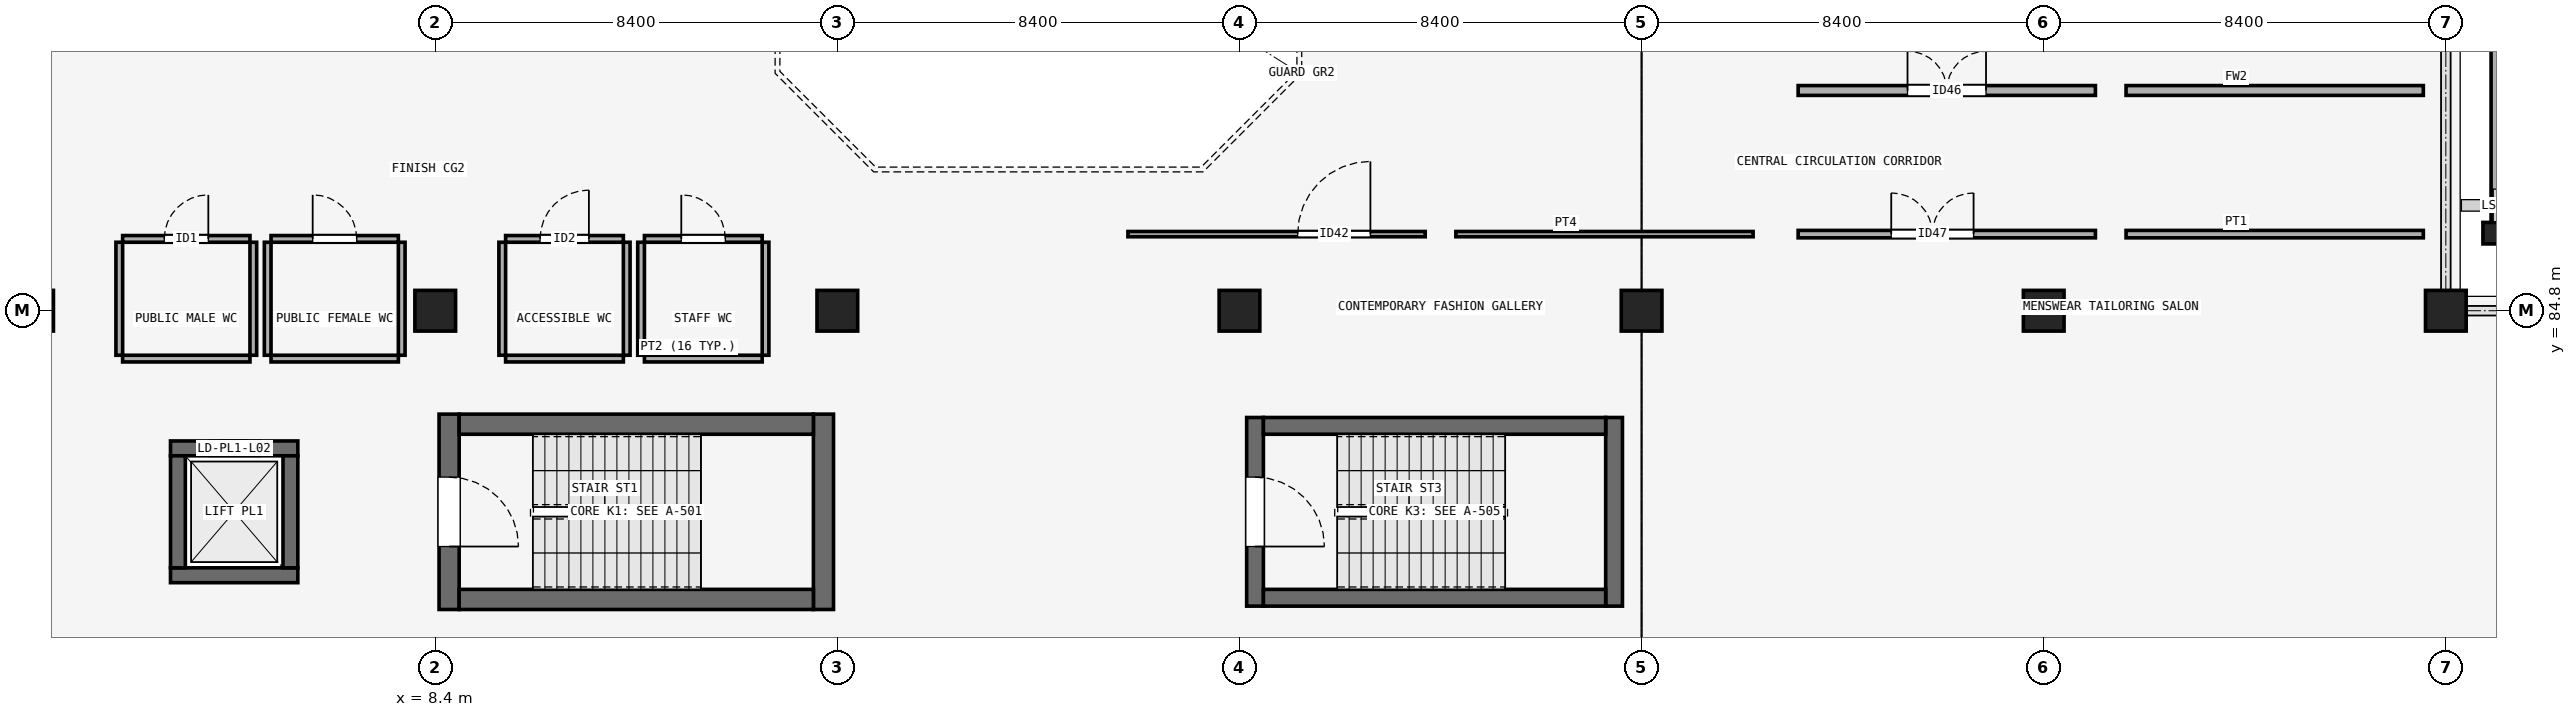
"""IFC4 building model, lengths in metres.
Left out: names, types, materials, properties, quantities, classifications, styles, units other than length and angle.
Written with IfcOpenShell. Run it as: python <this file> out.ifc"""

import sys

from ifc_helpers import new_model, si_unit, direction, frame, frame_2d, origin, origin_2d, place, context, subcontext, project, spatial, rectangle, extrude, element, fill, save


model = new_model("IFC4")
c1 = context("Model", 3, precision=1e-05, world=origin(), true_north=direction((0.0, 1.0)))
c2 = subcontext(c1, "Body", "Model", "MODEL_VIEW")
j1 = project(units=[si_unit("LENGTHUNIT", "METRE"), si_unit("PLANEANGLEUNIT", "RADIAN")], contexts=[c1])
p1 = place(None, origin())
s1 = spatial("IfcSite", under=j1, at=p1, CompositionType="ELEMENT")
p2 = place(p1, origin())
s2 = spatial("IfcBuilding", under=s1, at=p2, CompositionType="ELEMENT")
p3 = place(p2, frame((0.0, 0.0, 9.9)))
s3 = spatial("IfcBuildingStorey", under=s2, at=p3, CompositionType="ELEMENT", Elevation=9.9)
for number, where, z_axis, x_axis in (
    (1, (0.0, 84.8, 0.0), (0.0, 0.0, 1.0), (1.0, 0.0, 0.0)),
    (2, (8.4, 84.8, 0.0), (0.0, 0.0, 1.0), (1.0, 0.0, 0.0)),
    (3, (16.8, 84.8, 0.0), (0.0, 0.0, 1.0), (1.0, 0.0, 0.0)),
    (4, (25.2, 84.8, 0.0), (0.0, 0.0, 1.0), (1.0, 0.0, 0.0)),
    (5, (33.6, 84.8, 0.0), (0.0, 0.0, 1.0), (1.0, 0.0, 0.0)),
    (6, (42.0, 84.8, 0.0), (0.0, 0.0, 1.0), (1.0, 0.0, 0.0)),
    (7, (50.4, 84.8, 0.0), (0.0, 0.0, 1.0), (1.0, 0.0, 0.0)),
):
    element("IfcColumn", number, at=place(p3, frame(where, z_axis=z_axis, x_axis=x_axis)), inside=s3, PredefinedType="COLUMN", context=c2, shape_type="SweptSolid", body=[
        extrude(rectangle(XDim=0.85, YDim=0.85, at=origin_2d()), origin(), (0.0, 0.0, 1.0), 4.5),
    ])
p4 = place(p3, frame((51.45, 86.42, 0.0), z_axis=(0.0, 0.0, 1.0), x_axis=(0.0, 1.0, 0.0)))
e8 = element("IfcColumn", 8, at=p4, inside=s3, PredefinedType="PILASTER", context=c2, shape_type="SweptSolid", body=[
    extrude(rectangle(XDim=0.45, YDim=0.55, at=origin_2d()), origin(), (0.0, 0.0, 1.0), 4.5),
])
p5 = place(p3, frame((51.45, 86.67, 3.88), z_axis=(0.0, 0.0, 1.0), x_axis=(0.0, 1.0, 0.0)))
e9 = element("IfcWall", 9, at=p5, inside=s3, PredefinedType="PARAPET", context=c2, shape_type="SweptSolid", body=[
    extrude(rectangle(XDim=4.66, YDim=0.21, at=frame_2d((2.33, 0.0))), origin(), (0.0, 0.0, 1.0), 0.12),
])
p6 = place(p3, frame((8.69, 82.64, 0.0), z_axis=(0.0, 0.0, 1.0), x_axis=(0.0, -1.0, 0.0)))
e10 = element("IfcWall", 10, at=p6, inside=s3, PredefinedType="SHEAR", context=c2, shape_type="SweptSolid", body=[
    extrude(rectangle(XDim=4.08, YDim=0.42, at=frame_2d((2.04, 0.0))), origin(), (0.0, 0.0, 1.0), 4.2),
])
p7 = place(p6, frame((1.315, 0.0, 0.0)))
e11 = element("IfcOpeningElement", 11, at=p7, cuts=e10, PredefinedType="OPENING", context=c2, shape_type="SweptSolid", body=[
    extrude(rectangle(XDim=1.45, YDim=2.2, at=frame_2d((0.725, 1.1))), frame((0.0, 0.22, 0.0), z_axis=(0.0, -1.0, 0.0), x_axis=(1.0, 0.0, 0.0)), (0.0, 0.0, 1.0), 0.44),
])
p8 = place(p3, frame((16.51, 78.56, 0.0), z_axis=(0.0, 0.0, 1.0), x_axis=(0.0, 1.0, 0.0)))
e12 = element("IfcWall", 12, at=p8, inside=s3, PredefinedType="SHEAR", context=c2, shape_type="SweptSolid", body=[
    extrude(rectangle(XDim=4.08, YDim=0.42, at=frame_2d((2.04, 0.0))), origin(), (0.0, 0.0, 1.0), 4.2),
])
for number, where, z_axis, x_axis in (
    (13, (8.9, 78.77, 0.0), (0.0, 0.0, 1.0), (1.0, 0.0, 0.0)),
    (14, (8.9, 82.43, 0.0), (0.0, 0.0, 1.0), (1.0, 0.0, 0.0)),
):
    element("IfcWall", number, at=place(p3, frame(where, z_axis=z_axis, x_axis=x_axis)), inside=s3, PredefinedType="SHEAR", context=c2, shape_type="SweptSolid", body=[
        extrude(rectangle(XDim=7.4, YDim=0.42, at=frame_2d((3.7, 0.0))), origin(), (0.0, 0.0, 1.0), 4.2),
    ])
p9 = place(p3, frame((25.525, 82.57, 0.0), z_axis=(0.0, 0.0, 1.0), x_axis=(0.0, -1.0, 0.0)))
e15 = element("IfcWall", 15, at=p9, inside=s3, PredefinedType="SHEAR", context=c2, shape_type="SweptSolid", body=[
    extrude(rectangle(XDim=3.94, YDim=0.35, at=frame_2d((1.97, 0.0))), origin(), (0.0, 0.0, 1.0), 4.2),
])
p10 = place(p9, frame((1.245, 0.0, 0.0)))
e16 = element("IfcOpeningElement", 16, at=p10, cuts=e15, PredefinedType="OPENING", context=c2, shape_type="SweptSolid", body=[
    extrude(rectangle(XDim=1.45, YDim=2.2, at=frame_2d((0.725, 1.1))), frame((0.0, 0.185, 0.0), z_axis=(0.0, -1.0, 0.0), x_axis=(1.0, 0.0, 0.0)), (0.0, 0.0, 1.0), 0.37),
])
p11 = place(p3, frame((33.025, 78.63, 0.0), z_axis=(0.0, 0.0, 1.0), x_axis=(0.0, 1.0, 0.0)))
e17 = element("IfcWall", 17, at=p11, inside=s3, PredefinedType="SHEAR", context=c2, shape_type="SweptSolid", body=[
    extrude(rectangle(XDim=3.94, YDim=0.35, at=frame_2d((1.97, 0.0))), origin(), (0.0, 0.0, 1.0), 4.2),
])
for number, where, z_axis, x_axis in (
    (18, (25.7, 78.805, 0.0), (0.0, 0.0, 1.0), (1.0, 0.0, 0.0)),
    (19, (25.7, 82.395, 0.0), (0.0, 0.0, 1.0), (1.0, 0.0, 0.0)),
):
    element("IfcWall", number, at=place(p3, frame(where, z_axis=z_axis, x_axis=x_axis)), inside=s3, PredefinedType="SHEAR", context=c2, shape_type="SweptSolid", body=[
        extrude(rectangle(XDim=7.15, YDim=0.35, at=frame_2d((3.575, 0.0))), origin(), (0.0, 0.0, 1.0), 4.2),
    ])
p12 = place(p3, frame((2.87, 79.275, 0.0), z_axis=(0.0, 0.0, 1.0), x_axis=(1.0, 0.0, 0.0)))
e20 = element("IfcWall", 20, at=p12, inside=s3, PredefinedType="SHEAR", context=c2, shape_type="SweptSolid", body=[
    extrude(rectangle(XDim=2.66, YDim=0.31, at=frame_2d((1.33, 0.0))), origin(), (0.0, 0.0, 1.0), 4.2),
])
p13 = place(p3, frame((2.87, 81.925, 0.0), z_axis=(0.0, 0.0, 1.0), x_axis=(1.0, 0.0, 0.0)))
e21 = element("IfcWall", 21, at=p13, inside=s3, PredefinedType="SHEAR", context=c2, shape_type="SweptSolid", body=[
    extrude(rectangle(XDim=2.66, YDim=0.31, at=frame_2d((1.33, 0.0))), origin(), (0.0, 0.0, 1.0), 4.2),
])
p14 = place(p13, frame((0.78, 0.0, 0.0)))
e22 = element("IfcOpeningElement", 22, at=p14, cuts=e21, PredefinedType="OPENING", context=c2, shape_type="SweptSolid", body=[
    extrude(rectangle(XDim=1.1, YDim=2.2, at=frame_2d((0.55, 1.1))), frame((0.0, 0.165, 0.0), z_axis=(0.0, -1.0, 0.0), x_axis=(1.0, 0.0, 0.0)), (0.0, 0.0, 1.0), 0.33),
])
for number, where, z_axis, x_axis in (
    (23, (3.025, 79.43, 0.0), (0.0, 0.0, 1.0), (0.0, 1.0, 0.0)),
    (24, (5.375, 79.43, 0.0), (0.0, 0.0, 1.0), (0.0, 1.0, 0.0)),
):
    element("IfcWall", number, at=place(p3, frame(where, z_axis=z_axis, x_axis=x_axis)), inside=s3, PredefinedType="SHEAR", context=c2, shape_type="SweptSolid", body=[
        extrude(rectangle(XDim=2.34, YDim=0.31, at=frame_2d((1.17, 0.0))), origin(), (0.0, 0.0, 1.0), 4.2),
    ])
p15 = place(p3, frame((1.87, 86.3, 0.0), z_axis=(0.0, 0.0, 1.0), x_axis=(1.0, 0.0, 0.0)))
e25 = element("IfcWall", 25, at=p15, inside=s3, PredefinedType="PARTITIONING", context=c2, shape_type="SweptSolid", body=[
    extrude(rectangle(XDim=2.66, YDim=0.14, at=frame_2d((1.33, 0.0))), origin(), (0.0, 0.0, 1.0), 4.2),
])
p16 = place(p15, frame((0.87, 0.0, 0.0)))
e26 = element("IfcOpeningElement", 26, at=p16, cuts=e25, PredefinedType="OPENING", context=c2, shape_type="SweptSolid", body=[
    extrude(rectangle(XDim=0.92, YDim=2.12, at=frame_2d((0.46, 1.06))), frame((0.0, 0.08, 0.0), z_axis=(0.0, -1.0, 0.0), x_axis=(1.0, 0.0, 0.0)), (0.0, 0.0, 1.0), 0.16),
])
p17 = place(p3, frame((1.87, 83.8, 0.0), z_axis=(0.0, 0.0, 1.0), x_axis=(1.0, 0.0, 0.0)))
e27 = element("IfcWall", 27, at=p17, inside=s3, PredefinedType="PARTITIONING", context=c2, shape_type="SweptSolid", body=[
    extrude(rectangle(XDim=2.66, YDim=0.14, at=frame_2d((1.33, 0.0))), origin(), (0.0, 0.0, 1.0), 4.2),
])
for number, where, z_axis, x_axis in (
    (28, (1.8, 83.87, 0.0), (0.0, 0.0, 1.0), (0.0, 1.0, 0.0)),
    (29, (4.6, 83.87, 0.0), (0.0, 0.0, 1.0), (0.0, 1.0, 0.0)),
):
    element("IfcWall", number, at=place(p3, frame(where, z_axis=z_axis, x_axis=x_axis)), inside=s3, PredefinedType="PARTITIONING", context=c2, shape_type="SweptSolid", body=[
        extrude(rectangle(XDim=2.36, YDim=0.14, at=frame_2d((1.18, 0.0))), origin(), (0.0, 0.0, 1.0), 3.45),
    ])
p18 = place(p3, frame((4.97, 86.3, 0.0), z_axis=(0.0, 0.0, 1.0), x_axis=(1.0, 0.0, 0.0)))
e30 = element("IfcWall", 30, at=p18, inside=s3, PredefinedType="PARTITIONING", context=c2, shape_type="SweptSolid", body=[
    extrude(rectangle(XDim=2.66, YDim=0.14, at=frame_2d((1.33, 0.0))), origin(), (0.0, 0.0, 1.0), 4.2),
])
p19 = place(p18, frame((0.87, 0.0, 0.0)))
e31 = element("IfcOpeningElement", 31, at=p19, cuts=e30, PredefinedType="OPENING", context=c2, shape_type="SweptSolid", body=[
    extrude(rectangle(XDim=0.92, YDim=2.12, at=frame_2d((0.46, 1.06))), frame((0.0, 0.08, 0.0), z_axis=(0.0, -1.0, 0.0), x_axis=(1.0, 0.0, 0.0)), (0.0, 0.0, 1.0), 0.16),
])
p20 = place(p3, frame((4.97, 83.8, 0.0), z_axis=(0.0, 0.0, 1.0), x_axis=(1.0, 0.0, 0.0)))
e32 = element("IfcWall", 32, at=p20, inside=s3, PredefinedType="PARTITIONING", context=c2, shape_type="SweptSolid", body=[
    extrude(rectangle(XDim=2.66, YDim=0.14, at=frame_2d((1.33, 0.0))), origin(), (0.0, 0.0, 1.0), 4.2),
])
for number, where, z_axis, x_axis in (
    (33, (4.9, 83.87, 0.0), (0.0, 0.0, 1.0), (0.0, 1.0, 0.0)),
    (34, (7.7, 83.87, 0.0), (0.0, 0.0, 1.0), (0.0, 1.0, 0.0)),
):
    element("IfcWall", number, at=place(p3, frame(where, z_axis=z_axis, x_axis=x_axis)), inside=s3, PredefinedType="PARTITIONING", context=c2, shape_type="SweptSolid", body=[
        extrude(rectangle(XDim=2.36, YDim=0.14, at=frame_2d((1.18, 0.0))), origin(), (0.0, 0.0, 1.0), 3.45),
    ])
p21 = place(p3, frame((9.87, 86.3, 0.0), z_axis=(0.0, 0.0, 1.0), x_axis=(1.0, 0.0, 0.0)))
e35 = element("IfcWall", 35, at=p21, inside=s3, PredefinedType="PARTITIONING", context=c2, shape_type="SweptSolid", body=[
    extrude(rectangle(XDim=2.46, YDim=0.14, at=frame_2d((1.23, 0.0))), origin(), (0.0, 0.0, 1.0), 4.2),
])
p22 = place(p21, frame((0.72, 0.0, 0.0)))
e36 = element("IfcOpeningElement", 36, at=p22, cuts=e35, PredefinedType="OPENING", context=c2, shape_type="SweptSolid", body=[
    extrude(rectangle(XDim=1.02, YDim=2.15, at=frame_2d((0.51, 1.075))), frame((0.0, 0.08, 0.0), z_axis=(0.0, -1.0, 0.0), x_axis=(1.0, 0.0, 0.0)), (0.0, 0.0, 1.0), 0.16),
])
p23 = place(p3, frame((9.87, 83.8, 0.0), z_axis=(0.0, 0.0, 1.0), x_axis=(1.0, 0.0, 0.0)))
e37 = element("IfcWall", 37, at=p23, inside=s3, PredefinedType="PARTITIONING", context=c2, shape_type="SweptSolid", body=[
    extrude(rectangle(XDim=2.46, YDim=0.14, at=frame_2d((1.23, 0.0))), origin(), (0.0, 0.0, 1.0), 4.2),
])
for number, where, z_axis, x_axis in (
    (38, (9.8, 83.87, 0.0), (0.0, 0.0, 1.0), (0.0, 1.0, 0.0)),
    (39, (12.4, 83.87, 0.0), (0.0, 0.0, 1.0), (0.0, 1.0, 0.0)),
):
    element("IfcWall", number, at=place(p3, frame(where, z_axis=z_axis, x_axis=x_axis)), inside=s3, PredefinedType="PARTITIONING", context=c2, shape_type="SweptSolid", body=[
        extrude(rectangle(XDim=2.36, YDim=0.14, at=frame_2d((1.18, 0.0))), origin(), (0.0, 0.0, 1.0), 3.45),
    ])
p24 = place(p3, frame((12.77, 86.3, 0.0), z_axis=(0.0, 0.0, 1.0), x_axis=(1.0, 0.0, 0.0)))
e40 = element("IfcWall", 40, at=p24, inside=s3, PredefinedType="PARTITIONING", context=c2, shape_type="SweptSolid", body=[
    extrude(rectangle(XDim=2.46, YDim=0.14, at=frame_2d((1.23, 0.0))), origin(), (0.0, 0.0, 1.0), 4.2),
])
p25 = place(p24, frame((0.77, 0.0, 0.0)))
e41 = element("IfcOpeningElement", 41, at=p25, cuts=e40, PredefinedType="OPENING", context=c2, shape_type="SweptSolid", body=[
    extrude(rectangle(XDim=0.92, YDim=2.12, at=frame_2d((0.46, 1.06))), frame((0.0, 0.08, 0.0), z_axis=(0.0, -1.0, 0.0), x_axis=(1.0, 0.0, 0.0)), (0.0, 0.0, 1.0), 0.16),
])
p26 = place(p3, frame((12.77, 83.8, 0.0), z_axis=(0.0, 0.0, 1.0), x_axis=(1.0, 0.0, 0.0)))
e42 = element("IfcWall", 42, at=p26, inside=s3, PredefinedType="PARTITIONING", context=c2, shape_type="SweptSolid", body=[
    extrude(rectangle(XDim=2.46, YDim=0.14, at=frame_2d((1.23, 0.0))), origin(), (0.0, 0.0, 1.0), 4.2),
])
for number, where, z_axis, x_axis in (
    (43, (12.7, 83.87, 0.0), (0.0, 0.0, 1.0), (0.0, 1.0, 0.0)),
    (44, (15.3, 83.87, 0.0), (0.0, 0.0, 1.0), (0.0, 1.0, 0.0)),
):
    element("IfcWall", number, at=place(p3, frame(where, z_axis=z_axis, x_axis=x_axis)), inside=s3, PredefinedType="PARTITIONING", context=c2, shape_type="SweptSolid", body=[
        extrude(rectangle(XDim=2.36, YDim=0.14, at=frame_2d((1.18, 0.0))), origin(), (0.0, 0.0, 1.0), 3.45),
    ])
p27 = place(p3, frame((22.87, 86.4, 0.0), z_axis=(0.0, 0.0, 1.0), x_axis=(1.0, 0.0, 0.0)))
e45 = element("IfcWall", 45, at=p27, inside=s3, PredefinedType="PARTITIONING", context=c2, shape_type="SweptSolid", body=[
    extrude(rectangle(XDim=6.21, YDim=0.11, at=frame_2d((3.105, 0.0))), origin(), (0.0, 0.0, 1.0), 4.2),
])
p28 = place(p27, frame((3.545, 0.0, 0.0)))
e46 = element("IfcOpeningElement", 46, at=p28, cuts=e45, PredefinedType="OPENING", context=c2, shape_type="SweptSolid", body=[
    extrude(rectangle(XDim=1.52, YDim=2.46, at=frame_2d((0.76, 1.23))), frame((0.0, 0.065, 0.0), z_axis=(0.0, -1.0, 0.0), x_axis=(1.0, 0.0, 0.0)), (0.0, 0.0, 1.0), 0.13),
])
p29 = place(p3, frame((29.72, 86.4, 0.0), z_axis=(0.0, 0.0, 1.0), x_axis=(1.0, 0.0, 0.0)))
e47 = element("IfcWall", 47, at=p29, inside=s3, PredefinedType="PARTITIONING", context=c2, shape_type="SweptSolid", body=[
    extrude(rectangle(XDim=6.21, YDim=0.11, at=frame_2d((3.105, 0.0))), origin(), (0.0, 0.0, 1.0), 3.45),
])
p30 = place(p3, frame((36.87, 89.4, 0.0), z_axis=(0.0, 0.0, 1.0), x_axis=(1.0, 0.0, 0.0)))
e48 = element("IfcWall", 48, at=p30, inside=s3, PredefinedType="PARTITIONING", context=c2, shape_type="SweptSolid", body=[
    extrude(rectangle(XDim=6.21, YDim=0.205, at=frame_2d((3.105, 0.0))), origin(), (0.0, 0.0, 1.0), 3.45),
])
p31 = place(p30, frame((2.285, 0.0, 0.0)))
e49 = element("IfcOpeningElement", 49, at=p31, cuts=e48, PredefinedType="OPENING", context=c2, shape_type="SweptSolid", body=[
    extrude(rectangle(XDim=1.64, YDim=2.46, at=frame_2d((0.82, 1.23))), frame((0.0, 0.113, 0.0), z_axis=(0.0, -1.0, 0.0), x_axis=(1.0, 0.0, 0.0)), (0.0, 0.0, 1.0), 0.225),
])
p32 = place(p3, frame((43.72, 89.4, 0.0), z_axis=(0.0, 0.0, 1.0), x_axis=(1.0, 0.0, 0.0)))
e50 = element("IfcWall", 50, at=p32, inside=s3, PredefinedType="PARTITIONING", context=c2, shape_type="SweptSolid", body=[
    extrude(rectangle(XDim=6.21, YDim=0.205, at=frame_2d((3.105, 0.0))), origin(), (0.0, 0.0, 1.0), 4.2),
])
p33 = place(p3, frame((36.87, 86.4, 0.0), z_axis=(0.0, 0.0, 1.0), x_axis=(1.0, 0.0, 0.0)))
e51 = element("IfcWall", 51, at=p33, inside=s3, PredefinedType="PARTITIONING", context=c2, shape_type="SweptSolid", body=[
    extrude(rectangle(XDim=6.21, YDim=0.155, at=frame_2d((3.105, 0.0))), origin(), (0.0, 0.0, 1.0), 3.45),
])
p34 = place(p33, frame((1.945, 0.0, 0.0)))
e52 = element("IfcOpeningElement", 52, at=p34, cuts=e51, PredefinedType="OPENING", context=c2, shape_type="SweptSolid", body=[
    extrude(rectangle(XDim=1.72, YDim=2.1, at=frame_2d((0.86, 1.05))), frame((0.0, 0.087, 0.0), z_axis=(0.0, -1.0, 0.0), x_axis=(1.0, 0.0, 0.0)), (0.0, 0.0, 1.0), 0.175),
])
p35 = place(p3, frame((43.72, 86.4, 0.0), z_axis=(0.0, 0.0, 1.0), x_axis=(1.0, 0.0, 0.0)))
e53 = element("IfcWall", 53, at=p35, inside=s3, PredefinedType="PARTITIONING", context=c2, shape_type="SweptSolid", body=[
    extrude(rectangle(XDim=6.21, YDim=0.155, at=frame_2d((3.105, 0.0))), origin(), (0.0, 0.0, 1.0), 4.2),
])
p36 = place(p7, origin())
e54 = element("IfcDoor", 54, at=p36, inside=s3, OperationType="SINGLE_SWING_RIGHT", PredefinedType="DOOR", context=c2, shape_type="SweptSolid", body=[
    extrude(rectangle(XDim=1.45, YDim=2.2, at=frame_2d((0.725, 1.1))), frame((0.0, 0.025, 0.0), z_axis=(0.0, -1.0, 0.0), x_axis=(1.0, 0.0, 0.0)), (0.0, 0.0, 1.0), 0.05),
])
fill(e11, e54)
p37 = place(p10, origin())
e55 = element("IfcDoor", 55, at=p37, inside=s3, OperationType="SINGLE_SWING_RIGHT", PredefinedType="DOOR", context=c2, shape_type="SweptSolid", body=[
    extrude(rectangle(XDim=1.45, YDim=2.2, at=frame_2d((0.725, 1.1))), frame((0.0, 0.025, 0.0), z_axis=(0.0, -1.0, 0.0), x_axis=(1.0, 0.0, 0.0)), (0.0, 0.0, 1.0), 0.05),
])
fill(e16, e55)
p38 = place(p14, origin())
e56 = element("IfcDoor", 56, at=p38, inside=s3, OperationType="SLIDING_TO_LEFT", PredefinedType="DOOR", context=c2, shape_type="SweptSolid", body=[
    extrude(rectangle(XDim=1.1, YDim=2.2, at=frame_2d((0.55, 1.1))), frame((0.0, 0.025, 0.0), z_axis=(0.0, -1.0, 0.0), x_axis=(1.0, 0.0, 0.0)), (0.0, 0.0, 1.0), 0.05),
])
fill(e22, e56)
p39 = place(p16, origin())
e57 = element("IfcDoor", 57, at=p39, inside=s3, OperationType="SINGLE_SWING_RIGHT", PredefinedType="DOOR", context=c2, shape_type="SweptSolid", body=[
    extrude(rectangle(XDim=0.92, YDim=2.12, at=frame_2d((0.46, 1.06))), frame((0.0, 0.025, 0.0), z_axis=(0.0, -1.0, 0.0), x_axis=(1.0, 0.0, 0.0)), (0.0, 0.0, 1.0), 0.05),
])
fill(e26, e57)
p40 = place(p19, origin())
e58 = element("IfcDoor", 58, at=p40, inside=s3, OperationType="SINGLE_SWING_LEFT", PredefinedType="DOOR", context=c2, shape_type="SweptSolid", body=[
    extrude(rectangle(XDim=0.92, YDim=2.12, at=frame_2d((0.46, 1.06))), frame((0.0, 0.025, 0.0), z_axis=(0.0, -1.0, 0.0), x_axis=(1.0, 0.0, 0.0)), (0.0, 0.0, 1.0), 0.05),
])
fill(e31, e58)
p41 = place(p22, origin())
e59 = element("IfcDoor", 59, at=p41, inside=s3, OperationType="SINGLE_SWING_RIGHT", PredefinedType="DOOR", context=c2, shape_type="SweptSolid", body=[
    extrude(rectangle(XDim=1.02, YDim=2.15, at=frame_2d((0.51, 1.075))), frame((0.0, 0.025, 0.0), z_axis=(0.0, -1.0, 0.0), x_axis=(1.0, 0.0, 0.0)), (0.0, 0.0, 1.0), 0.05),
])
fill(e36, e59)
p42 = place(p25, origin())
e60 = element("IfcDoor", 60, at=p42, inside=s3, OperationType="SINGLE_SWING_LEFT", PredefinedType="DOOR", context=c2, shape_type="SweptSolid", body=[
    extrude(rectangle(XDim=0.92, YDim=2.12, at=frame_2d((0.46, 1.06))), frame((0.0, 0.025, 0.0), z_axis=(0.0, -1.0, 0.0), x_axis=(1.0, 0.0, 0.0)), (0.0, 0.0, 1.0), 0.05),
])
fill(e41, e60)
p43 = place(p28, origin())
e61 = element("IfcDoor", 61, at=p43, inside=s3, OperationType="SINGLE_SWING_RIGHT", PredefinedType="DOOR", context=c2, shape_type="SweptSolid", body=[
    extrude(rectangle(XDim=1.52, YDim=2.46, at=frame_2d((0.76, 1.23))), frame((0.0, 0.025, 0.0), z_axis=(0.0, -1.0, 0.0), x_axis=(1.0, 0.0, 0.0)), (0.0, 0.0, 1.0), 0.05),
])
fill(e46, e61)
p44 = place(p31, origin())
e62 = element("IfcDoor", 62, at=p44, inside=s3, OperationType="DOUBLE_DOOR_SINGLE_SWING", PredefinedType="DOOR", context=c2, shape_type="SweptSolid", body=[
    extrude(rectangle(XDim=1.64, YDim=2.46, at=frame_2d((0.82, 1.23))), frame((0.0, 0.025, 0.0), z_axis=(0.0, -1.0, 0.0), x_axis=(1.0, 0.0, 0.0)), (0.0, 0.0, 1.0), 0.05),
])
fill(e49, e62)
p45 = place(p34, origin())
e63 = element("IfcDoor", 63, at=p45, inside=s3, OperationType="DOUBLE_DOOR_SINGLE_SWING", PredefinedType="DOOR", context=c2, shape_type="SweptSolid", body=[
    extrude(rectangle(XDim=1.72, YDim=2.1, at=frame_2d((0.86, 1.05))), frame((0.0, 0.025, 0.0), z_axis=(0.0, -1.0, 0.0), x_axis=(1.0, 0.0, 0.0)), (0.0, 0.0, 1.0), 0.05),
])
fill(e52, e63)
save(model, sys.argv[1])
